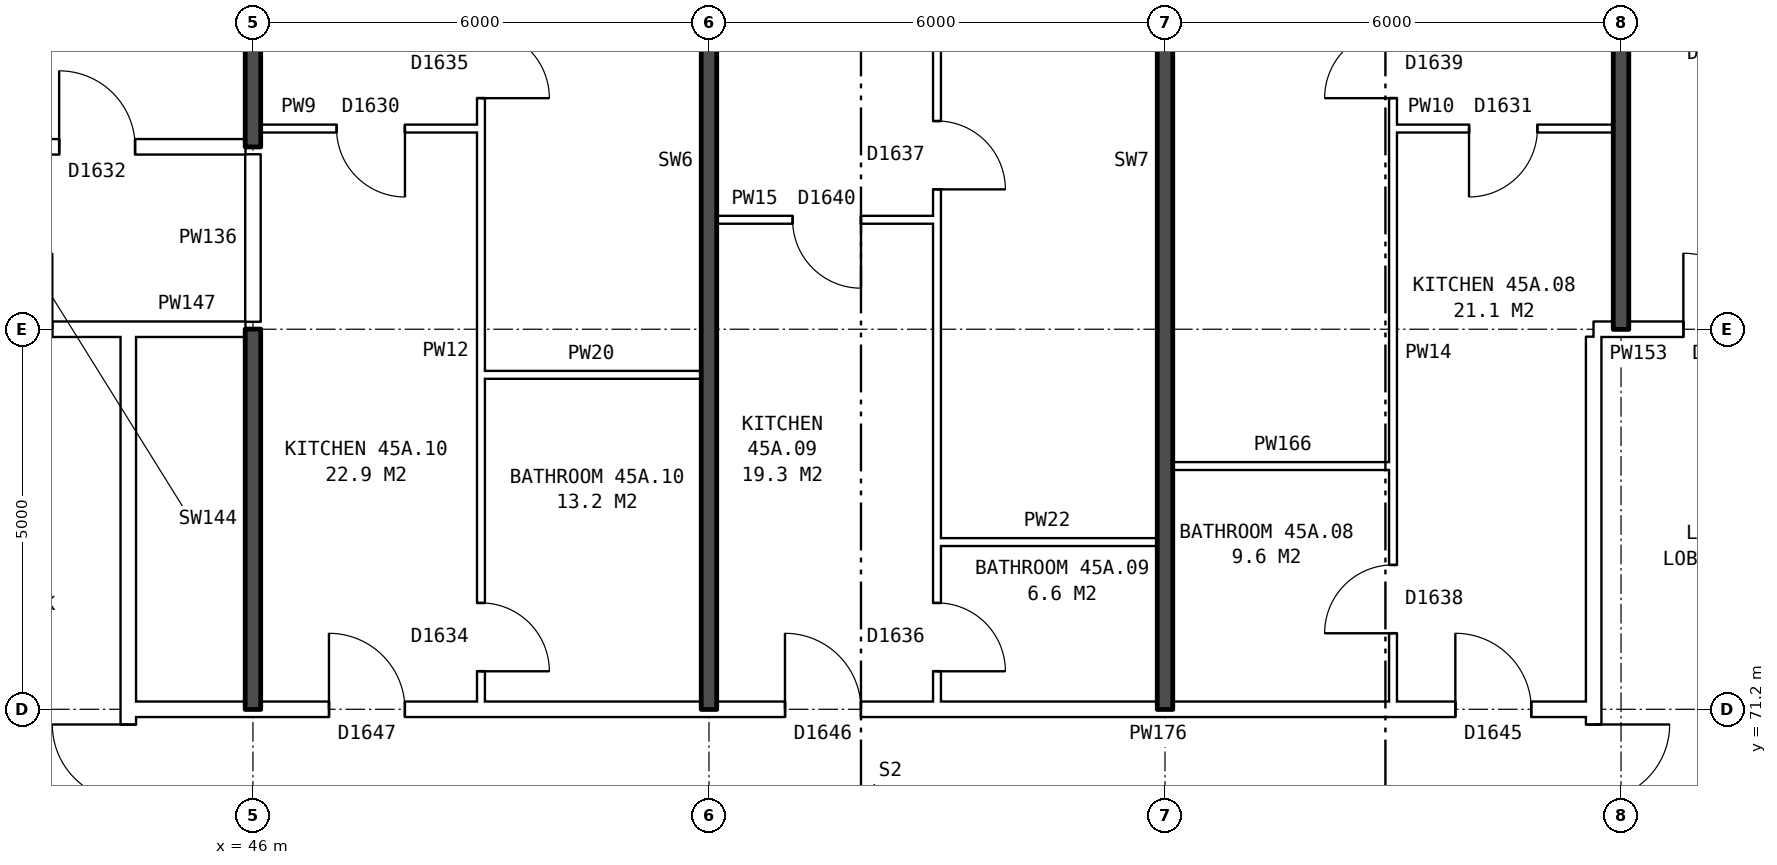
"""IFC4 building model, lengths in metres.
Left out: names, types, materials, properties, quantities, classifications, styles, units other than length and angle.
Written with IfcOpenShell. Run it as: python <this file> out.ifc"""

import sys

from ifc_helpers import new_model, si_unit, direction, frame, frame_2d, origin, place, context, subcontext, project, spatial, rectangle, extrude, element, fill, save


model = new_model("IFC4")
c1 = context("Model", 3, precision=1e-05, world=origin(), true_north=direction((0.0, 1.0)))
c2 = subcontext(c1, "Body", "Model", "MODEL_VIEW")
j1 = project(units=[si_unit("LENGTHUNIT", "METRE"), si_unit("PLANEANGLEUNIT", "RADIAN")], contexts=[c1])
p1 = place(None, origin())
s1 = spatial("IfcSite", under=j1, at=p1, CompositionType="ELEMENT")
p2 = place(p1, origin())
s2 = spatial("IfcBuilding", under=s1, at=p2, CompositionType="ELEMENT")
p3 = place(p2, frame((0.0, 0.0, 160.9)))
s3 = spatial("IfcBuildingStorey", under=s2, at=p3, CompositionType="ELEMENT", Elevation=160.9)
p4 = place(p3, frame((63.64, 63.9, 0.0), z_axis=(0.0, 0.0, 1.0), x_axis=(0.0, 1.0, 0.0)))
e1 = element("IfcWall", 1, at=p4, inside=s3, PredefinedType="PARTITIONING", context=c2, shape_type="SweptSolid", body=[
    extrude(rectangle(XDim=12.2, YDim=0.2, at=frame_2d((6.1, 0.0))), origin(), (0.0, 0.0, 1.0), 2.85),
])
p5 = place(p4, frame((5.1, 0.0, 0.0)))
e2 = element("IfcOpeningElement", 2, at=p5, cuts=e1, PredefinedType="OPENING", context=c2, shape_type="SweptSolid", body=[
    extrude(rectangle(XDim=2.0, YDim=2.1, at=frame_2d((1.0, 1.05))), frame((0.0, 0.11, 0.0), z_axis=(0.0, -1.0, 0.0), x_axis=(1.0, 0.0, 0.0)), (0.0, 0.0, 1.0), 0.22),
])
p6 = place(p3, frame((44.36, 63.9, 0.0), z_axis=(0.0, 0.0, 1.0), x_axis=(0.0, 1.0, 0.0)))
e3 = element("IfcWall", 3, at=p6, inside=s3, PredefinedType="PARTITIONING", context=c2, shape_type="SweptSolid", body=[
    extrude(rectangle(XDim=12.2, YDim=0.2, at=frame_2d((6.1, 0.0))), origin(), (0.0, 0.0, 1.0), 2.85),
])
p7 = place(p6, frame((5.1, 0.0, 0.0)))
e4 = element("IfcOpeningElement", 4, at=p7, cuts=e3, PredefinedType="OPENING", context=c2, shape_type="SweptSolid", body=[
    extrude(rectangle(XDim=2.0, YDim=2.1, at=frame_2d((1.0, 1.05))), frame((0.0, 0.11, 0.0), z_axis=(0.0, -1.0, 0.0), x_axis=(1.0, 0.0, 0.0)), (0.0, 0.0, 1.0), 0.22),
])
p8 = place(p3, frame((44.36, 71.2, 0.0), z_axis=(0.0, 0.0, 1.0), x_axis=(1.0, 0.0, 0.0)))
e5 = element("IfcWall", 5, at=p8, inside=s3, PredefinedType="PARTITIONING", context=c2, shape_type="SweptSolid", body=[
    extrude(rectangle(XDim=19.28, YDim=0.2, at=frame_2d((9.64, 0.0))), origin(), (0.0, 0.0, 1.0), 2.85),
])
p9 = place(p8, frame((17.46, 0.0, 0.0)))
e6 = element("IfcOpeningElement", 6, at=p9, cuts=e5, PredefinedType="OPENING", context=c2, shape_type="SweptSolid", body=[
    extrude(rectangle(XDim=1.0, YDim=2.1, at=frame_2d((0.5, 1.05))), frame((0.0, 0.11, 0.0), z_axis=(0.0, -1.0, 0.0), x_axis=(1.0, 0.0, 0.0)), (0.0, 0.0, 1.0), 0.22),
])
p10 = place(p8, frame((8.64, 0.0, 0.0)))
e7 = element("IfcOpeningElement", 7, at=p10, cuts=e5, PredefinedType="OPENING", context=c2, shape_type="SweptSolid", body=[
    extrude(rectangle(XDim=1.0, YDim=2.1, at=frame_2d((0.5, 1.05))), frame((0.0, 0.11, 0.0), z_axis=(0.0, -1.0, 0.0), x_axis=(1.0, 0.0, 0.0)), (0.0, 0.0, 1.0), 0.22),
])
p11 = place(p8, frame((2.64, 0.0, 0.0)))
e8 = element("IfcOpeningElement", 8, at=p11, cuts=e5, PredefinedType="OPENING", context=c2, shape_type="SweptSolid", body=[
    extrude(rectangle(XDim=1.0, YDim=2.1, at=frame_2d((0.5, 1.05))), frame((0.0, 0.11, 0.0), z_axis=(0.0, -1.0, 0.0), x_axis=(1.0, 0.0, 0.0)), (0.0, 0.0, 1.0), 0.22),
])
for number, where, z_axis, x_axis in (
    (9, (55.0, 73.4, 0.0), (0.0, 0.0, 1.0), (1.0, 0.0, 0.0)),
    (10, (58.1, 74.4, 0.0), (0.0, 0.0, 1.0), (1.0, 0.0, 0.0)),
    (11, (49.0, 75.6, 0.0), (0.0, 0.0, 1.0), (1.0, 0.0, 0.0)),
):
    element("IfcWall", number, at=place(p3, frame(where, z_axis=z_axis, x_axis=x_axis)), inside=s3, PredefinedType="PARTITIONING", context=c2, shape_type="SweptSolid", body=[
        extrude(rectangle(XDim=2.9, YDim=0.1, at=frame_2d((1.45, 0.0))), origin(), (0.0, 0.0, 1.0), 2.85),
    ])
p12 = place(p3, frame((41.36, 76.2, 0.0), z_axis=(0.0, 0.0, 1.0), x_axis=(1.0, 0.0, 0.0)))
e12 = element("IfcWall", 12, at=p12, inside=s3, PredefinedType="PARTITIONING", context=c2, shape_type="SweptSolid", body=[
    extrude(rectangle(XDim=3.0, YDim=0.2, at=frame_2d((1.5, 0.0))), origin(), (0.0, 0.0, 1.0), 2.85),
])
p13 = place(p12, frame((1.0, 0.0, 0.0)))
e13 = element("IfcOpeningElement", 13, at=p13, cuts=e12, PredefinedType="OPENING", context=c2, shape_type="SweptSolid", body=[
    extrude(rectangle(XDim=1.0, YDim=2.1, at=frame_2d((0.5, 1.05))), frame((0.0, 0.11, 0.0), z_axis=(0.0, -1.0, 0.0), x_axis=(1.0, 0.0, 0.0)), (0.0, 0.0, 1.0), 0.22),
])
p14 = place(p3, frame((44.36, 76.2, 0.0), z_axis=(0.0, 0.0, 1.0), x_axis=(1.0, 0.0, 0.0)))
e14 = element("IfcWall", 14, at=p14, inside=s3, PredefinedType="PARTITIONING", context=c2, shape_type="SweptSolid", body=[
    extrude(rectangle(XDim=1.54, YDim=0.2, at=frame_2d((0.77, 0.0))), origin(), (0.0, 0.0, 1.0), 2.85),
])
p15 = place(p3, frame((63.64, 76.2, 0.0), z_axis=(0.0, 0.0, 1.0), x_axis=(1.0, 0.0, 0.0)))
e15 = element("IfcWall", 15, at=p15, inside=s3, PredefinedType="PARTITIONING", context=c2, shape_type="SweptSolid", body=[
    extrude(rectangle(XDim=3.0, YDim=0.2, at=frame_2d((1.5, 0.0))), origin(), (0.0, 0.0, 1.0), 2.85),
])
p16 = place(p15, frame((1.18, 0.0, 0.0)))
e16 = element("IfcOpeningElement", 16, at=p16, cuts=e15, PredefinedType="OPENING", context=c2, shape_type="SweptSolid", body=[
    extrude(rectangle(XDim=1.0, YDim=2.1, at=frame_2d((0.5, 1.05))), frame((0.0, 0.11, 0.0), z_axis=(0.0, -1.0, 0.0), x_axis=(1.0, 0.0, 0.0)), (0.0, 0.0, 1.0), 0.22),
])
p17 = place(p3, frame((52.1, 77.64, 0.0), z_axis=(0.0, 0.0, 1.0), x_axis=(1.0, 0.0, 0.0)))
e17 = element("IfcWall", 17, at=p17, inside=s3, PredefinedType="PARTITIONING", context=c2, shape_type="SweptSolid", body=[
    extrude(rectangle(XDim=2.9, YDim=0.1, at=frame_2d((1.45, 0.0))), origin(), (0.0, 0.0, 1.0), 2.85),
])
p18 = place(p17, frame((1.0, 0.0, 0.0)))
e18 = element("IfcOpeningElement", 18, at=p18, cuts=e17, PredefinedType="OPENING", context=c2, shape_type="SweptSolid", body=[
    extrude(rectangle(XDim=0.9, YDim=2.1, at=frame_2d((0.45, 1.05))), frame((0.0, 0.06, 0.0), z_axis=(0.0, -1.0, 0.0), x_axis=(1.0, 0.0, 0.0)), (0.0, 0.0, 1.0), 0.12),
])
p19 = place(p3, frame((28.86, 78.6, 0.0), z_axis=(0.0, 0.0, 1.0), x_axis=(1.0, 0.0, 0.0)))
e19 = element("IfcWall", 19, at=p19, inside=s3, PredefinedType="PARTITIONING", context=c2, shape_type="SweptSolid", body=[
    extrude(rectangle(XDim=17.04, YDim=0.2, at=frame_2d((8.52, 0.0))), origin(), (0.0, 0.0, 1.0), 2.85),
])
p20 = place(p19, frame((14.59, 0.0, 0.0)))
e20 = element("IfcOpeningElement", 20, at=p20, cuts=e19, PredefinedType="OPENING", context=c2, shape_type="SweptSolid", body=[
    extrude(rectangle(XDim=1.0, YDim=2.1, at=frame_2d((0.5, 1.05))), frame((0.0, 0.11, 0.0), z_axis=(0.0, -1.0, 0.0), x_axis=(1.0, 0.0, 0.0)), (0.0, 0.0, 1.0), 0.22),
])
p21 = place(p19, frame((7.64, 0.0, 0.0)))
e21 = element("IfcOpeningElement", 21, at=p21, cuts=e19, PredefinedType="OPENING", context=c2, shape_type="SweptSolid", body=[
    extrude(rectangle(XDim=1.0, YDim=2.1, at=frame_2d((0.5, 1.05))), frame((0.0, 0.11, 0.0), z_axis=(0.0, -1.0, 0.0), x_axis=(1.0, 0.0, 0.0)), (0.0, 0.0, 1.0), 0.22),
])
p22 = place(p3, frame((46.1, 78.84, 0.0), z_axis=(0.0, 0.0, 1.0), x_axis=(1.0, 0.0, 0.0)))
e22 = element("IfcWall", 22, at=p22, inside=s3, PredefinedType="PARTITIONING", context=c2, shape_type="SweptSolid", body=[
    extrude(rectangle(XDim=2.9, YDim=0.1, at=frame_2d((1.45, 0.0))), origin(), (0.0, 0.0, 1.0), 2.85),
])
p23 = place(p22, frame((1.0, 0.0, 0.0)))
e23 = element("IfcOpeningElement", 23, at=p23, cuts=e22, PredefinedType="OPENING", context=c2, shape_type="SweptSolid", body=[
    extrude(rectangle(XDim=0.9, YDim=2.1, at=frame_2d((0.45, 1.05))), frame((0.0, 0.06, 0.0), z_axis=(0.0, -1.0, 0.0), x_axis=(1.0, 0.0, 0.0)), (0.0, 0.0, 1.0), 0.12),
])
p24 = place(p3, frame((61.0, 78.84, 0.0), z_axis=(0.0, 0.0, 1.0), x_axis=(1.0, 0.0, 0.0)))
e24 = element("IfcWall", 24, at=p24, inside=s3, PredefinedType="PARTITIONING", context=c2, shape_type="SweptSolid", body=[
    extrude(rectangle(XDim=2.9, YDim=0.1, at=frame_2d((1.45, 0.0))), origin(), (0.0, 0.0, 1.0), 2.85),
])
p25 = place(p24, frame((1.0, 0.0, 0.0)))
e25 = element("IfcOpeningElement", 25, at=p25, cuts=e24, PredefinedType="OPENING", context=c2, shape_type="SweptSolid", body=[
    extrude(rectangle(XDim=0.9, YDim=2.1, at=frame_2d((0.45, 1.05))), frame((0.0, 0.06, 0.0), z_axis=(0.0, -1.0, 0.0), x_axis=(1.0, 0.0, 0.0)), (0.0, 0.0, 1.0), 0.12),
])
p26 = place(p3, frame((46.0, 71.2, 0.0), z_axis=(0.0, 0.0, 1.0), x_axis=(0.0, 1.0, 0.0)))
e26 = element("IfcWall", 26, at=p26, inside=s3, PredefinedType="SOLIDWALL", context=c2, shape_type="SweptSolid", body=[
    extrude(rectangle(XDim=5.0, YDim=0.2, at=frame_2d((2.5, 0.0))), origin(), (0.0, 0.0, 1.0), 2.85),
])
p27 = place(p3, frame((46.0, 76.3, 0.0), z_axis=(0.0, 0.0, 1.0), x_axis=(0.0, 1.0, 0.0)))
e27 = element("IfcWall", 27, at=p27, inside=s3, PredefinedType="PARTITIONING", context=c2, shape_type="SweptSolid", body=[
    extrude(rectangle(XDim=2.2, YDim=0.2, at=frame_2d((1.1, 0.0))), origin(), (0.0, 0.0, 1.0), 2.85),
])
p28 = place(p3, frame((46.0, 78.6, 0.0), z_axis=(0.0, 0.0, 1.0), x_axis=(0.0, 1.0, 0.0)))
e28 = element("IfcWall", 28, at=p28, inside=s3, PredefinedType="SOLIDWALL", context=c2, shape_type="SweptSolid", body=[
    extrude(rectangle(XDim=7.04, YDim=0.2, at=frame_2d((3.52, 0.0))), origin(), (0.0, 0.0, 1.0), 2.85),
])
p29 = place(p3, frame((49.0, 71.3, 0.0), z_axis=(0.0, 0.0, 1.0), x_axis=(0.0, 1.0, 0.0)))
e29 = element("IfcWall", 29, at=p29, inside=s3, PredefinedType="PARTITIONING", context=c2, shape_type="SweptSolid", body=[
    extrude(rectangle(XDim=14.34, YDim=0.1, at=frame_2d((7.17, 0.0))), origin(), (0.0, 0.0, 1.0), 2.85),
])
p30 = place(p29, frame((7.94, 0.0, 0.0)))
e30 = element("IfcOpeningElement", 30, at=p30, cuts=e29, PredefinedType="OPENING", context=c2, shape_type="SweptSolid", body=[
    extrude(rectangle(XDim=0.9, YDim=2.1, at=frame_2d((0.45, 1.05))), frame((0.0, 0.06, 0.0), z_axis=(0.0, -1.0, 0.0), x_axis=(1.0, 0.0, 0.0)), (0.0, 0.0, 1.0), 0.12),
])
p31 = place(p29, frame((0.4, 0.0, 0.0)))
e31 = element("IfcOpeningElement", 31, at=p31, cuts=e29, PredefinedType="OPENING", context=c2, shape_type="SweptSolid", body=[
    extrude(rectangle(XDim=0.9, YDim=2.1, at=frame_2d((0.45, 1.05))), frame((0.0, 0.06, 0.0), z_axis=(0.0, -1.0, 0.0), x_axis=(1.0, 0.0, 0.0)), (0.0, 0.0, 1.0), 0.12),
])
p32 = place(p3, frame((52.0, 71.2, 0.0), z_axis=(0.0, 0.0, 1.0), x_axis=(0.0, 1.0, 0.0)))
e32 = element("IfcWall", 32, at=p32, inside=s3, PredefinedType="SOLIDWALL", context=c2, shape_type="SweptSolid", body=[
    extrude(rectangle(XDim=14.44, YDim=0.2, at=frame_2d((7.22, 0.0))), origin(), (0.0, 0.0, 1.0), 2.85),
])
p33 = place(p3, frame((55.0, 71.3, 0.0), z_axis=(0.0, 0.0, 1.0), x_axis=(0.0, 1.0, 0.0)))
e33 = element("IfcWall", 33, at=p33, inside=s3, PredefinedType="PARTITIONING", context=c2, shape_type="SweptSolid", body=[
    extrude(rectangle(XDim=14.34, YDim=0.1, at=frame_2d((7.17, 0.0))), origin(), (0.0, 0.0, 1.0), 2.85),
])
p34 = place(p33, frame((6.74, 0.0, 0.0)))
e34 = element("IfcOpeningElement", 34, at=p34, cuts=e33, PredefinedType="OPENING", context=c2, shape_type="SweptSolid", body=[
    extrude(rectangle(XDim=0.9, YDim=2.1, at=frame_2d((0.45, 1.05))), frame((0.0, 0.06, 0.0), z_axis=(0.0, -1.0, 0.0), x_axis=(1.0, 0.0, 0.0)), (0.0, 0.0, 1.0), 0.12),
])
p35 = place(p33, frame((0.4, 0.0, 0.0)))
e35 = element("IfcOpeningElement", 35, at=p35, cuts=e33, PredefinedType="OPENING", context=c2, shape_type="SweptSolid", body=[
    extrude(rectangle(XDim=0.9, YDim=2.1, at=frame_2d((0.45, 1.05))), frame((0.0, 0.06, 0.0), z_axis=(0.0, -1.0, 0.0), x_axis=(1.0, 0.0, 0.0)), (0.0, 0.0, 1.0), 0.12),
])
p36 = place(p3, frame((58.0, 71.2, 0.0), z_axis=(0.0, 0.0, 1.0), x_axis=(0.0, 1.0, 0.0)))
e36 = element("IfcWall", 36, at=p36, inside=s3, PredefinedType="SOLIDWALL", context=c2, shape_type="SweptSolid", body=[
    extrude(rectangle(XDim=14.44, YDim=0.2, at=frame_2d((7.22, 0.0))), origin(), (0.0, 0.0, 1.0), 2.85),
])
p37 = place(p3, frame((61.0, 71.3, 0.0), z_axis=(0.0, 0.0, 1.0), x_axis=(0.0, 1.0, 0.0)))
e37 = element("IfcWall", 37, at=p37, inside=s3, PredefinedType="PARTITIONING", context=c2, shape_type="SweptSolid", body=[
    extrude(rectangle(XDim=14.34, YDim=0.1, at=frame_2d((7.17, 0.0))), origin(), (0.0, 0.0, 1.0), 2.85),
])
p38 = place(p37, frame((7.94, 0.0, 0.0)))
e38 = element("IfcOpeningElement", 38, at=p38, cuts=e37, PredefinedType="OPENING", context=c2, shape_type="SweptSolid", body=[
    extrude(rectangle(XDim=0.9, YDim=2.1, at=frame_2d((0.45, 1.05))), frame((0.0, 0.06, 0.0), z_axis=(0.0, -1.0, 0.0), x_axis=(1.0, 0.0, 0.0)), (0.0, 0.0, 1.0), 0.12),
])
p39 = place(p37, frame((0.9, 0.0, 0.0)))
e39 = element("IfcOpeningElement", 39, at=p39, cuts=e37, PredefinedType="OPENING", context=c2, shape_type="SweptSolid", body=[
    extrude(rectangle(XDim=0.9, YDim=2.1, at=frame_2d((0.45, 1.05))), frame((0.0, 0.06, 0.0), z_axis=(0.0, -1.0, 0.0), x_axis=(1.0, 0.0, 0.0)), (0.0, 0.0, 1.0), 0.12),
])
p40 = place(p3, frame((64.0, 76.2, 0.0), z_axis=(0.0, 0.0, 1.0), x_axis=(0.0, 1.0, 0.0)))
e40 = element("IfcWall", 40, at=p40, inside=s3, PredefinedType="SOLIDWALL", context=c2, shape_type="SweptSolid", body=[
    extrude(rectangle(XDim=9.44, YDim=0.2, at=frame_2d((4.72, 0.0))), origin(), (0.0, 0.0, 1.0), 2.85),
])
p41 = place(p5, frame((2.0, 0.0, 0.0), z_axis=(0.0, 0.0, 1.0), x_axis=(-1.0, 0.0, 0.0)))
e41 = element("IfcDoor", 41, at=p41, inside=s3, OperationType="DOUBLE_DOOR_SINGLE_SWING", PredefinedType="DOOR", context=c2, shape_type="SweptSolid", body=[
    extrude(rectangle(XDim=2.0, YDim=2.1, at=frame_2d((1.0, 1.05))), frame((0.0, 0.025, 0.0), z_axis=(0.0, -1.0, 0.0), x_axis=(1.0, 0.0, 0.0)), (0.0, 0.0, 1.0), 0.05),
])
fill(e2, e41)
p42 = place(p7, origin())
e42 = element("IfcDoor", 42, at=p42, inside=s3, OperationType="DOUBLE_DOOR_SINGLE_SWING", PredefinedType="DOOR", context=c2, shape_type="SweptSolid", body=[
    extrude(rectangle(XDim=2.0, YDim=2.1, at=frame_2d((1.0, 1.05))), frame((0.0, 0.025, 0.0), z_axis=(0.0, -1.0, 0.0), x_axis=(1.0, 0.0, 0.0)), (0.0, 0.0, 1.0), 0.05),
])
fill(e4, e42)
p43 = place(p16, origin())
e43 = element("IfcDoor", 43, at=p43, inside=s3, OperationType="SINGLE_SWING_LEFT", PredefinedType="DOOR", context=c2, shape_type="SweptSolid", body=[
    extrude(rectangle(XDim=1.0, YDim=2.1, at=frame_2d((0.5, 1.05))), frame((0.0, 0.025, 0.0), z_axis=(0.0, -1.0, 0.0), x_axis=(1.0, 0.0, 0.0)), (0.0, 0.0, 1.0), 0.05),
])
fill(e16, e43)
p44 = place(p38, origin())
e44 = element("IfcDoor", 44, at=p44, inside=s3, OperationType="SINGLE_SWING_LEFT", PredefinedType="DOOR", context=c2, shape_type="SweptSolid", body=[
    extrude(rectangle(XDim=0.9, YDim=2.1, at=frame_2d((0.45, 1.05))), frame((0.0, 0.025, 0.0), z_axis=(0.0, -1.0, 0.0), x_axis=(1.0, 0.0, 0.0)), (0.0, 0.0, 1.0), 0.05),
])
fill(e38, e44)
p45 = place(p9, origin())
e45 = element("IfcDoor", 45, at=p45, inside=s3, OperationType="SINGLE_SWING_LEFT", PredefinedType="DOOR", context=c2, shape_type="SweptSolid", body=[
    extrude(rectangle(XDim=1.0, YDim=2.1, at=frame_2d((0.5, 1.05))), frame((0.0, 0.025, 0.0), z_axis=(0.0, -1.0, 0.0), x_axis=(1.0, 0.0, 0.0)), (0.0, 0.0, 1.0), 0.05),
])
fill(e6, e45)
p46 = place(p25, frame((0.9, 0.0, 0.0), z_axis=(0.0, 0.0, 1.0), x_axis=(-1.0, 0.0, 0.0)))
e46 = element("IfcDoor", 46, at=p46, inside=s3, OperationType="SINGLE_SWING_RIGHT", PredefinedType="DOOR", context=c2, shape_type="SweptSolid", body=[
    extrude(rectangle(XDim=0.9, YDim=2.1, at=frame_2d((0.45, 1.05))), frame((0.0, 0.025, 0.0), z_axis=(0.0, -1.0, 0.0), x_axis=(1.0, 0.0, 0.0)), (0.0, 0.0, 1.0), 0.05),
])
fill(e25, e46)
p47 = place(p39, origin())
e47 = element("IfcDoor", 47, at=p47, inside=s3, OperationType="SINGLE_SWING_LEFT", PredefinedType="DOOR", context=c2, shape_type="SweptSolid", body=[
    extrude(rectangle(XDim=0.9, YDim=2.1, at=frame_2d((0.45, 1.05))), frame((0.0, 0.025, 0.0), z_axis=(0.0, -1.0, 0.0), x_axis=(1.0, 0.0, 0.0)), (0.0, 0.0, 1.0), 0.05),
])
fill(e39, e47)
p48 = place(p34, frame((0.9, 0.0, 0.0), z_axis=(0.0, 0.0, 1.0), x_axis=(-1.0, 0.0, 0.0)))
e48 = element("IfcDoor", 48, at=p48, inside=s3, OperationType="SINGLE_SWING_RIGHT", PredefinedType="DOOR", context=c2, shape_type="SweptSolid", body=[
    extrude(rectangle(XDim=0.9, YDim=2.1, at=frame_2d((0.45, 1.05))), frame((0.0, 0.025, 0.0), z_axis=(0.0, -1.0, 0.0), x_axis=(1.0, 0.0, 0.0)), (0.0, 0.0, 1.0), 0.05),
])
fill(e34, e48)
p49 = place(p10, origin())
e49 = element("IfcDoor", 49, at=p49, inside=s3, OperationType="SINGLE_SWING_LEFT", PredefinedType="DOOR", context=c2, shape_type="SweptSolid", body=[
    extrude(rectangle(XDim=1.0, YDim=2.1, at=frame_2d((0.5, 1.05))), frame((0.0, 0.025, 0.0), z_axis=(0.0, -1.0, 0.0), x_axis=(1.0, 0.0, 0.0)), (0.0, 0.0, 1.0), 0.05),
])
fill(e7, e49)
p50 = place(p18, frame((0.9, 0.0, 0.0), z_axis=(0.0, 0.0, 1.0), x_axis=(-1.0, 0.0, 0.0)))
e50 = element("IfcDoor", 50, at=p50, inside=s3, OperationType="SINGLE_SWING_LEFT", PredefinedType="DOOR", context=c2, shape_type="SweptSolid", body=[
    extrude(rectangle(XDim=0.9, YDim=2.1, at=frame_2d((0.45, 1.05))), frame((0.0, 0.025, 0.0), z_axis=(0.0, -1.0, 0.0), x_axis=(1.0, 0.0, 0.0)), (0.0, 0.0, 1.0), 0.05),
])
fill(e18, e50)
p51 = place(p35, frame((0.9, 0.0, 0.0), z_axis=(0.0, 0.0, 1.0), x_axis=(-1.0, 0.0, 0.0)))
e51 = element("IfcDoor", 51, at=p51, inside=s3, OperationType="SINGLE_SWING_RIGHT", PredefinedType="DOOR", context=c2, shape_type="SweptSolid", body=[
    extrude(rectangle(XDim=0.9, YDim=2.1, at=frame_2d((0.45, 1.05))), frame((0.0, 0.025, 0.0), z_axis=(0.0, -1.0, 0.0), x_axis=(1.0, 0.0, 0.0)), (0.0, 0.0, 1.0), 0.05),
])
fill(e35, e51)
p52 = place(p30, frame((0.9, 0.0, 0.0), z_axis=(0.0, 0.0, 1.0), x_axis=(-1.0, 0.0, 0.0)))
e52 = element("IfcDoor", 52, at=p52, inside=s3, OperationType="SINGLE_SWING_RIGHT", PredefinedType="DOOR", context=c2, shape_type="SweptSolid", body=[
    extrude(rectangle(XDim=0.9, YDim=2.1, at=frame_2d((0.45, 1.05))), frame((0.0, 0.025, 0.0), z_axis=(0.0, -1.0, 0.0), x_axis=(1.0, 0.0, 0.0)), (0.0, 0.0, 1.0), 0.05),
])
fill(e30, e52)
p53 = place(p11, origin())
e53 = element("IfcDoor", 53, at=p53, inside=s3, OperationType="SINGLE_SWING_LEFT", PredefinedType="DOOR", context=c2, shape_type="SweptSolid", body=[
    extrude(rectangle(XDim=1.0, YDim=2.1, at=frame_2d((0.5, 1.05))), frame((0.0, 0.025, 0.0), z_axis=(0.0, -1.0, 0.0), x_axis=(1.0, 0.0, 0.0)), (0.0, 0.0, 1.0), 0.05),
])
fill(e8, e53)
p54 = place(p23, frame((0.9, 0.0, 0.0), z_axis=(0.0, 0.0, 1.0), x_axis=(-1.0, 0.0, 0.0)))
e54 = element("IfcDoor", 54, at=p54, inside=s3, OperationType="SINGLE_SWING_LEFT", PredefinedType="DOOR", context=c2, shape_type="SweptSolid", body=[
    extrude(rectangle(XDim=0.9, YDim=2.1, at=frame_2d((0.45, 1.05))), frame((0.0, 0.025, 0.0), z_axis=(0.0, -1.0, 0.0), x_axis=(1.0, 0.0, 0.0)), (0.0, 0.0, 1.0), 0.05),
])
fill(e23, e54)
p55 = place(p31, frame((0.9, 0.0, 0.0), z_axis=(0.0, 0.0, 1.0), x_axis=(-1.0, 0.0, 0.0)))
e55 = element("IfcDoor", 55, at=p55, inside=s3, OperationType="SINGLE_SWING_RIGHT", PredefinedType="DOOR", context=c2, shape_type="SweptSolid", body=[
    extrude(rectangle(XDim=0.9, YDim=2.1, at=frame_2d((0.45, 1.05))), frame((0.0, 0.025, 0.0), z_axis=(0.0, -1.0, 0.0), x_axis=(1.0, 0.0, 0.0)), (0.0, 0.0, 1.0), 0.05),
])
fill(e31, e55)
p56 = place(p20, origin())
e56 = element("IfcDoor", 56, at=p56, inside=s3, OperationType="SINGLE_SWING_LEFT", PredefinedType="DOOR", context=c2, shape_type="SweptSolid", body=[
    extrude(rectangle(XDim=1.0, YDim=2.1, at=frame_2d((0.5, 1.05))), frame((0.0, 0.025, 0.0), z_axis=(0.0, -1.0, 0.0), x_axis=(1.0, 0.0, 0.0)), (0.0, 0.0, 1.0), 0.05),
])
fill(e20, e56)
save(model, sys.argv[1])
